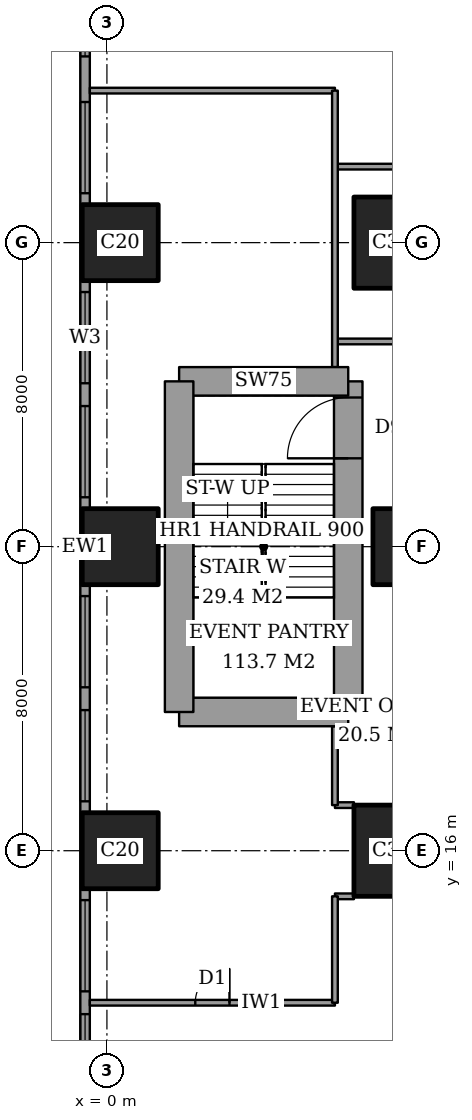
"""IFC4 building model, lengths in metres.
Left out: names, types, materials, properties, quantities, classifications, styles, units other than length and angle.
Written with IfcOpenShell. Run it as: python <this file> out.ifc"""

import sys

from ifc_helpers import new_model, si_unit, direction, frame, frame_2d, origin, origin_2d, place, context, subcontext, project, spatial, rectangle, extrude, element, fill, save


model = new_model("IFC4")
c1 = context("Model", 3, precision=1e-05, world=origin(), true_north=direction((0.0, 1.0)))
c2 = subcontext(c1, "Body", "Model", "MODEL_VIEW")
j1 = project(units=[si_unit("LENGTHUNIT", "METRE"), si_unit("PLANEANGLEUNIT", "RADIAN")], contexts=[c1])
p1 = place(None, origin())
s1 = spatial("IfcSite", under=j1, at=p1, CompositionType="ELEMENT")
p2 = place(p1, origin())
s2 = spatial("IfcBuilding", under=s1, at=p2, CompositionType="ELEMENT")
p3 = place(p2, frame((0.0, 0.0, 21.0)))
s3 = spatial("IfcBuildingStorey", under=s2, at=p3, CompositionType="ELEMENT", Elevation=21.0)
for number, where, z_axis, x_axis in (
    (1, (0.35, 16.0, 0.0), (0.0, 0.0, 1.0), (1.0, 0.0, 0.0)),
    (2, (0.35, 24.0, 0.0), (0.0, 0.0, 1.0), (1.0, 0.0, 0.0)),
    (3, (0.35, 32.0, 0.0), (0.0, 0.0, 1.0), (1.0, 0.0, 0.0)),
):
    element("IfcColumn", number, at=place(p3, frame(where, z_axis=z_axis, x_axis=x_axis)), inside=s3, PredefinedType="COLUMN", context=c2, shape_type="SweptSolid", body=[
        extrude(rectangle(XDim=2.0, YDim=2.0, at=origin_2d()), origin(), (0.0, 0.0, 1.0), 5.0),
    ])
p4 = place(p3, frame((8.0, 16.0, 0.0), z_axis=(0.0, 0.0, 1.0), x_axis=(1.0, 0.0, 0.0)))
e4 = element("IfcColumn", 4, at=p4, inside=s3, PredefinedType="COLUMN", context=c2, shape_type="SweptSolid", body=[
    extrude(rectangle(XDim=3.0, YDim=2.4, at=origin_2d()), origin(), (0.0, 0.0, 1.0), 5.0),
])
p5 = place(p3, frame((8.0, 24.0, 0.0), z_axis=(0.0, 0.0, 1.0), x_axis=(1.0, 0.0, 0.0)))
e5 = element("IfcColumn", 5, at=p5, inside=s3, PredefinedType="COLUMN", context=c2, shape_type="SweptSolid", body=[
    extrude(rectangle(XDim=2.0, YDim=2.0, at=origin_2d()), origin(), (0.0, 0.0, 1.0), 5.0),
])
p6 = place(p3, frame((8.0, 32.0, 0.0), z_axis=(0.0, 0.0, 1.0), x_axis=(1.0, 0.0, 0.0)))
e6 = element("IfcColumn", 6, at=p6, inside=s3, PredefinedType="COLUMN", context=c2, shape_type="SweptSolid", body=[
    extrude(rectangle(XDim=3.0, YDim=2.4, at=origin_2d()), origin(), (0.0, 0.0, 1.0), 5.0),
])
p7 = place(p3, frame((1.9, 19.65, 0.0), z_axis=(0.0, 0.0, 1.0), x_axis=(1.0, 0.0, 0.0)))
e7 = element("IfcWall", 7, at=p7, inside=s3, PredefinedType="SHEAR", context=c2, shape_type="SweptSolid", body=[
    extrude(rectangle(XDim=4.45, YDim=0.75, at=frame_2d((2.225, 0.0))), origin(), (0.0, 0.0, 1.0), 5.0),
])
p8 = place(p3, frame((6.35, 19.65, 0.0), z_axis=(0.0, 0.0, 1.0), x_axis=(0.0, 1.0, 0.0)))
e8 = element("IfcWall", 8, at=p8, inside=s3, PredefinedType="SHEAR", context=c2, shape_type="SweptSolid", body=[
    extrude(rectangle(XDim=8.7, YDim=0.75, at=frame_2d((4.35, 0.0))), origin(), (0.0, 0.0, 1.0), 5.0),
])
p9 = place(p8, frame((6.675, 0.0, 0.0)))
e9 = element("IfcOpeningElement", 9, at=p9, cuts=e8, PredefinedType="OPENING", context=c2, shape_type="SweptSolid", body=[
    extrude(rectangle(XDim=1.6, YDim=2.1, at=frame_2d((0.8, 1.05))), frame((0.0, 0.385, 0.0), z_axis=(0.0, -1.0, 0.0), x_axis=(1.0, 0.0, 0.0)), (0.0, 0.0, 1.0), 0.77),
])
p10 = place(p3, frame((6.35, 28.35, 0.0), z_axis=(0.0, 0.0, 1.0), x_axis=(-1.0, 0.0, 0.0)))
e10 = element("IfcWall", 10, at=p10, inside=s3, PredefinedType="SHEAR", context=c2, shape_type="SweptSolid", body=[
    extrude(rectangle(XDim=4.45, YDim=0.75, at=frame_2d((2.225, 0.0))), origin(), (0.0, 0.0, 1.0), 5.0),
])
p11 = place(p3, frame((1.9, 28.35, 0.0), z_axis=(0.0, 0.0, 1.0), x_axis=(0.0, -1.0, 0.0)))
e11 = element("IfcWall", 11, at=p11, inside=s3, PredefinedType="SHEAR", context=c2, shape_type="SweptSolid", body=[
    extrude(rectangle(XDim=8.7, YDim=0.75, at=frame_2d((4.35, 0.0))), origin(), (0.0, 0.0, 1.0), 5.0),
])
p12 = place(p3, frame((-0.575, 44.825, 0.0), z_axis=(0.0, 0.0, 1.0), x_axis=(0.0, -1.0, 0.0)))
e12 = element("IfcWall", 12, at=p12, inside=s3, PredefinedType="SOLIDWALL", context=c2, shape_type="SweptSolid", body=[
    extrude(rectangle(XDim=41.65, YDim=0.25, at=frame_2d((20.825, 0.0))), origin(), (0.0, 0.0, 1.0), 5.0),
])
p13 = place(p12, frame((6.725, 0.0, 0.6)))
e13 = element("IfcOpeningElement", 13, at=p13, cuts=e12, PredefinedType="OPENING", context=c2, shape_type="SweptSolid", body=[
    extrude(rectangle(XDim=1.2, YDim=3.0, at=frame_2d((0.6, 1.5))), frame((0.0, 0.135, 0.0), z_axis=(0.0, -1.0, 0.0), x_axis=(1.0, 0.0, 0.0)), (0.0, 0.0, 1.0), 0.27),
])
p14 = place(p12, frame((1.125, 0.0, 0.6)))
e14 = element("IfcOpeningElement", 14, at=p14, cuts=e12, PredefinedType="OPENING", context=c2, shape_type="SweptSolid", body=[
    extrude(rectangle(XDim=2.4, YDim=3.0, at=frame_2d((1.2, 1.5))), frame((0.0, 0.135, 0.0), z_axis=(0.0, -1.0, 0.0), x_axis=(1.0, 0.0, 0.0)), (0.0, 0.0, 1.0), 0.27),
])
p15 = place(p12, frame((9.125, 0.0, 0.6)))
e15 = element("IfcOpeningElement", 15, at=p15, cuts=e12, PredefinedType="OPENING", context=c2, shape_type="SweptSolid", body=[
    extrude(rectangle(XDim=2.4, YDim=3.0, at=frame_2d((1.2, 1.5))), frame((0.0, 0.135, 0.0), z_axis=(0.0, -1.0, 0.0), x_axis=(1.0, 0.0, 0.0)), (0.0, 0.0, 1.0), 0.27),
])
p16 = place(p12, frame((14.125, 0.0, 0.6)))
e16 = element("IfcOpeningElement", 16, at=p16, cuts=e12, PredefinedType="OPENING", context=c2, shape_type="SweptSolid", body=[
    extrude(rectangle(XDim=2.4, YDim=3.0, at=frame_2d((1.2, 1.5))), frame((0.0, 0.135, 0.0), z_axis=(0.0, -1.0, 0.0), x_axis=(1.0, 0.0, 0.0)), (0.0, 0.0, 1.0), 0.27),
])
p17 = place(p12, frame((17.125, 0.0, 0.6)))
e17 = element("IfcOpeningElement", 17, at=p17, cuts=e12, PredefinedType="OPENING", context=c2, shape_type="SweptSolid", body=[
    extrude(rectangle(XDim=2.4, YDim=3.0, at=frame_2d((1.2, 1.5))), frame((0.0, 0.135, 0.0), z_axis=(0.0, -1.0, 0.0), x_axis=(1.0, 0.0, 0.0)), (0.0, 0.0, 1.0), 0.27),
])
p18 = place(p12, frame((22.125, 0.0, 0.6)))
e18 = element("IfcOpeningElement", 18, at=p18, cuts=e12, PredefinedType="OPENING", context=c2, shape_type="SweptSolid", body=[
    extrude(rectangle(XDim=2.4, YDim=3.0, at=frame_2d((1.2, 1.5))), frame((0.0, 0.135, 0.0), z_axis=(0.0, -1.0, 0.0), x_axis=(1.0, 0.0, 0.0)), (0.0, 0.0, 1.0), 0.27),
])
p19 = place(p12, frame((25.125, 0.0, 0.6)))
e19 = element("IfcOpeningElement", 19, at=p19, cuts=e12, PredefinedType="OPENING", context=c2, shape_type="SweptSolid", body=[
    extrude(rectangle(XDim=2.4, YDim=3.0, at=frame_2d((1.2, 1.5))), frame((0.0, 0.135, 0.0), z_axis=(0.0, -1.0, 0.0), x_axis=(1.0, 0.0, 0.0)), (0.0, 0.0, 1.0), 0.27),
])
p20 = place(p12, frame((30.125, 0.0, 0.6)))
e20 = element("IfcOpeningElement", 20, at=p20, cuts=e12, PredefinedType="OPENING", context=c2, shape_type="SweptSolid", body=[
    extrude(rectangle(XDim=2.4, YDim=3.0, at=frame_2d((1.2, 1.5))), frame((0.0, 0.135, 0.0), z_axis=(0.0, -1.0, 0.0), x_axis=(1.0, 0.0, 0.0)), (0.0, 0.0, 1.0), 0.27),
])
p21 = place(p12, frame((33.125, 0.0, 0.6)))
e21 = element("IfcOpeningElement", 21, at=p21, cuts=e12, PredefinedType="OPENING", context=c2, shape_type="SweptSolid", body=[
    extrude(rectangle(XDim=2.4, YDim=3.0, at=frame_2d((1.2, 1.5))), frame((0.0, 0.135, 0.0), z_axis=(0.0, -1.0, 0.0), x_axis=(1.0, 0.0, 0.0)), (0.0, 0.0, 1.0), 0.27),
])
p22 = place(p12, frame((38.125, 0.0, 0.6)))
e22 = element("IfcOpeningElement", 22, at=p22, cuts=e12, PredefinedType="OPENING", context=c2, shape_type="SweptSolid", body=[
    extrude(rectangle(XDim=2.4, YDim=3.0, at=frame_2d((1.2, 1.5))), frame((0.0, 0.135, 0.0), z_axis=(0.0, -1.0, 0.0), x_axis=(1.0, 0.0, 0.0)), (0.0, 0.0, 1.0), 0.27),
])
p23 = place(p3, frame((-0.45, 12.0, 0.0), z_axis=(0.0, 0.0, 1.0), x_axis=(1.0, 0.0, 0.0)))
e23 = element("IfcWall", 23, at=p23, inside=s3, PredefinedType="PARTITIONING", context=c2, shape_type="SweptSolid", body=[
    extrude(rectangle(XDim=6.45, YDim=0.15, at=frame_2d((3.225, 0.0))), origin(), (0.0, 0.0, 1.0), 4.65),
])
p24 = place(p23, frame((2.775, 0.0, 0.0)))
e24 = element("IfcOpeningElement", 24, at=p24, cuts=e23, PredefinedType="OPENING", context=c2, shape_type="SweptSolid", body=[
    extrude(rectangle(XDim=0.9, YDim=2.1, at=frame_2d((0.45, 1.05))), frame((0.0, 0.085, 0.0), z_axis=(0.0, -1.0, 0.0), x_axis=(1.0, 0.0, 0.0)), (0.0, 0.0, 1.0), 0.17),
])
for number, where, z_axis, x_axis in (
    (25, (6.0, 14.8, 0.0), (0.0, 0.0, 1.0), (1.0, 0.0, 0.0)),
    (26, (6.0, 17.2, 0.0), (0.0, 0.0, 1.0), (1.0, 0.0, 0.0)),
):
    element("IfcWall", number, at=place(p3, frame(where, z_axis=z_axis, x_axis=x_axis)), inside=s3, PredefinedType="PARTITIONING", context=c2, shape_type="SweptSolid", body=[
        extrude(rectangle(XDim=0.5, YDim=0.15, at=frame_2d((0.25, 0.0))), origin(), (0.0, 0.0, 1.0), 4.65),
    ])
p25 = place(p3, frame((6.0, 29.4, 0.0), z_axis=(0.0, 0.0, 1.0), x_axis=(1.0, 0.0, 0.0)))
e27 = element("IfcWall", 27, at=p25, inside=s3, PredefinedType="PARTITIONING", context=c2, shape_type="SweptSolid", body=[
    extrude(rectangle(XDim=12.9, YDim=0.15, at=frame_2d((6.45, 0.0))), origin(), (0.0, 0.0, 1.0), 4.65),
])
p26 = place(p25, frame((5.95, 0.0, 0.0)))
e28 = element("IfcOpeningElement", 28, at=p26, cuts=e27, PredefinedType="OPENING", context=c2, shape_type="SweptSolid", body=[
    extrude(rectangle(XDim=1.0, YDim=2.1, at=frame_2d((0.5, 1.05))), frame((0.0, 0.085, 0.0), z_axis=(0.0, -1.0, 0.0), x_axis=(1.0, 0.0, 0.0)), (0.0, 0.0, 1.0), 0.17),
])
p27 = place(p3, frame((6.0, 34.0, 0.0), z_axis=(0.0, 0.0, 1.0), x_axis=(1.0, 0.0, 0.0)))
e29 = element("IfcWall", 29, at=p27, inside=s3, PredefinedType="PARTITIONING", context=c2, shape_type="SweptSolid", body=[
    extrude(rectangle(XDim=16.45, YDim=0.15, at=frame_2d((8.225, 0.0))), origin(), (0.0, 0.0, 1.0), 4.65),
])
p28 = place(p27, frame((5.55, 0.0, 0.0)))
e30 = element("IfcOpeningElement", 30, at=p28, cuts=e29, PredefinedType="OPENING", context=c2, shape_type="SweptSolid", body=[
    extrude(rectangle(XDim=1.8, YDim=2.1, at=frame_2d((0.9, 1.05))), frame((0.0, 0.085, 0.0), z_axis=(0.0, -1.0, 0.0), x_axis=(1.0, 0.0, 0.0)), (0.0, 0.0, 1.0), 0.17),
])
p29 = place(p3, frame((-0.45, 36.0, 0.0), z_axis=(0.0, 0.0, 1.0), x_axis=(1.0, 0.0, 0.0)))
e31 = element("IfcWall", 31, at=p29, inside=s3, PredefinedType="PARTITIONING", context=c2, shape_type="SweptSolid", body=[
    extrude(rectangle(XDim=6.45, YDim=0.15, at=frame_2d((3.225, 0.0))), origin(), (0.0, 0.0, 1.0), 4.65),
])
p30 = place(p3, frame((6.0, 12.0, 0.0), z_axis=(0.0, 0.0, 1.0), x_axis=(0.0, 1.0, 0.0)))
e32 = element("IfcWall", 32, at=p30, inside=s3, PredefinedType="PARTITIONING", context=c2, shape_type="SweptSolid", body=[
    extrude(rectangle(XDim=2.8, YDim=0.15, at=frame_2d((1.4, 0.0))), origin(), (0.0, 0.0, 1.0), 4.65),
])
p31 = place(p3, frame((6.0, 17.2, 0.0), z_axis=(0.0, 0.0, 1.0), x_axis=(0.0, 1.0, 0.0)))
e33 = element("IfcWall", 33, at=p31, inside=s3, PredefinedType="PARTITIONING", context=c2, shape_type="SweptSolid", body=[
    extrude(rectangle(XDim=2.075, YDim=0.15, at=frame_2d((1.038, 0.0))), origin(), (0.0, 0.0, 1.0), 4.65),
])
p32 = place(p3, frame((6.0, 28.725, 0.0), z_axis=(0.0, 0.0, 1.0), x_axis=(0.0, 1.0, 0.0)))
e34 = element("IfcWall", 34, at=p32, inside=s3, PredefinedType="PARTITIONING", context=c2, shape_type="SweptSolid", body=[
    extrude(rectangle(XDim=7.275, YDim=0.15, at=frame_2d((3.637, 0.0))), origin(), (0.0, 0.0, 1.0), 4.65),
])
p33 = place(p13, origin())
e35 = element("IfcWindow", 35, at=p33, inside=s3, PartitioningType="SINGLE_PANEL", PredefinedType="WINDOW", context=c2, shape_type="SweptSolid", body=[
    extrude(rectangle(XDim=1.2, YDim=3.0, at=frame_2d((0.6, 1.5))), frame((0.0, 0.03, 0.0), z_axis=(0.0, -1.0, 0.0), x_axis=(1.0, 0.0, 0.0)), (0.0, 0.0, 1.0), 0.06),
])
fill(e13, e35)
p34 = place(p15, origin())
e36 = element("IfcWindow", 36, at=p34, inside=s3, PartitioningType="SINGLE_PANEL", PredefinedType="WINDOW", context=c2, shape_type="SweptSolid", body=[
    extrude(rectangle(XDim=2.4, YDim=3.0, at=frame_2d((1.2, 1.5))), frame((0.0, 0.03, 0.0), z_axis=(0.0, -1.0, 0.0), x_axis=(1.0, 0.0, 0.0)), (0.0, 0.0, 1.0), 0.06),
])
fill(e15, e36)
p35 = place(p16, origin())
e37 = element("IfcWindow", 37, at=p35, inside=s3, PartitioningType="SINGLE_PANEL", PredefinedType="WINDOW", context=c2, shape_type="SweptSolid", body=[
    extrude(rectangle(XDim=2.4, YDim=3.0, at=frame_2d((1.2, 1.5))), frame((0.0, 0.03, 0.0), z_axis=(0.0, -1.0, 0.0), x_axis=(1.0, 0.0, 0.0)), (0.0, 0.0, 1.0), 0.06),
])
fill(e16, e37)
p36 = place(p17, origin())
e38 = element("IfcWindow", 38, at=p36, inside=s3, PartitioningType="SINGLE_PANEL", PredefinedType="WINDOW", context=c2, shape_type="SweptSolid", body=[
    extrude(rectangle(XDim=2.4, YDim=3.0, at=frame_2d((1.2, 1.5))), frame((0.0, 0.03, 0.0), z_axis=(0.0, -1.0, 0.0), x_axis=(1.0, 0.0, 0.0)), (0.0, 0.0, 1.0), 0.06),
])
fill(e17, e38)
p37 = place(p18, origin())
e39 = element("IfcWindow", 39, at=p37, inside=s3, PartitioningType="SINGLE_PANEL", PredefinedType="WINDOW", context=c2, shape_type="SweptSolid", body=[
    extrude(rectangle(XDim=2.4, YDim=3.0, at=frame_2d((1.2, 1.5))), frame((0.0, 0.03, 0.0), z_axis=(0.0, -1.0, 0.0), x_axis=(1.0, 0.0, 0.0)), (0.0, 0.0, 1.0), 0.06),
])
fill(e18, e39)
p38 = place(p19, origin())
e40 = element("IfcWindow", 40, at=p38, inside=s3, PartitioningType="SINGLE_PANEL", PredefinedType="WINDOW", context=c2, shape_type="SweptSolid", body=[
    extrude(rectangle(XDim=2.4, YDim=3.0, at=frame_2d((1.2, 1.5))), frame((0.0, 0.03, 0.0), z_axis=(0.0, -1.0, 0.0), x_axis=(1.0, 0.0, 0.0)), (0.0, 0.0, 1.0), 0.06),
])
fill(e19, e40)
p39 = place(p20, origin())
e41 = element("IfcWindow", 41, at=p39, inside=s3, PartitioningType="SINGLE_PANEL", PredefinedType="WINDOW", context=c2, shape_type="SweptSolid", body=[
    extrude(rectangle(XDim=2.4, YDim=3.0, at=frame_2d((1.2, 1.5))), frame((0.0, 0.03, 0.0), z_axis=(0.0, -1.0, 0.0), x_axis=(1.0, 0.0, 0.0)), (0.0, 0.0, 1.0), 0.06),
])
fill(e20, e41)
p40 = place(p21, origin())
e42 = element("IfcWindow", 42, at=p40, inside=s3, PartitioningType="SINGLE_PANEL", PredefinedType="WINDOW", context=c2, shape_type="SweptSolid", body=[
    extrude(rectangle(XDim=2.4, YDim=3.0, at=frame_2d((1.2, 1.5))), frame((0.0, 0.03, 0.0), z_axis=(0.0, -1.0, 0.0), x_axis=(1.0, 0.0, 0.0)), (0.0, 0.0, 1.0), 0.06),
])
fill(e21, e42)
p41 = place(p24, origin())
e43 = element("IfcDoor", 43, at=p41, inside=s3, OperationType="SINGLE_SWING_LEFT", PredefinedType="DOOR", context=c2, shape_type="SweptSolid", body=[
    extrude(rectangle(XDim=0.9, YDim=2.1, at=frame_2d((0.45, 1.05))), frame((0.0, 0.025, 0.0), z_axis=(0.0, -1.0, 0.0), x_axis=(1.0, 0.0, 0.0)), (0.0, 0.0, 1.0), 0.05),
])
fill(e24, e43)
p42 = place(p9, origin())
e44 = element("IfcDoor", 44, at=p42, inside=s3, OperationType="DOUBLE_DOOR_SINGLE_SWING", PredefinedType="DOOR", context=c2, shape_type="SweptSolid", body=[
    extrude(rectangle(XDim=1.6, YDim=2.1, at=frame_2d((0.8, 1.05))), frame((0.0, 0.025, 0.0), z_axis=(0.0, -1.0, 0.0), x_axis=(1.0, 0.0, 0.0)), (0.0, 0.0, 1.0), 0.05),
])
fill(e9, e44)
save(model, sys.argv[1])
